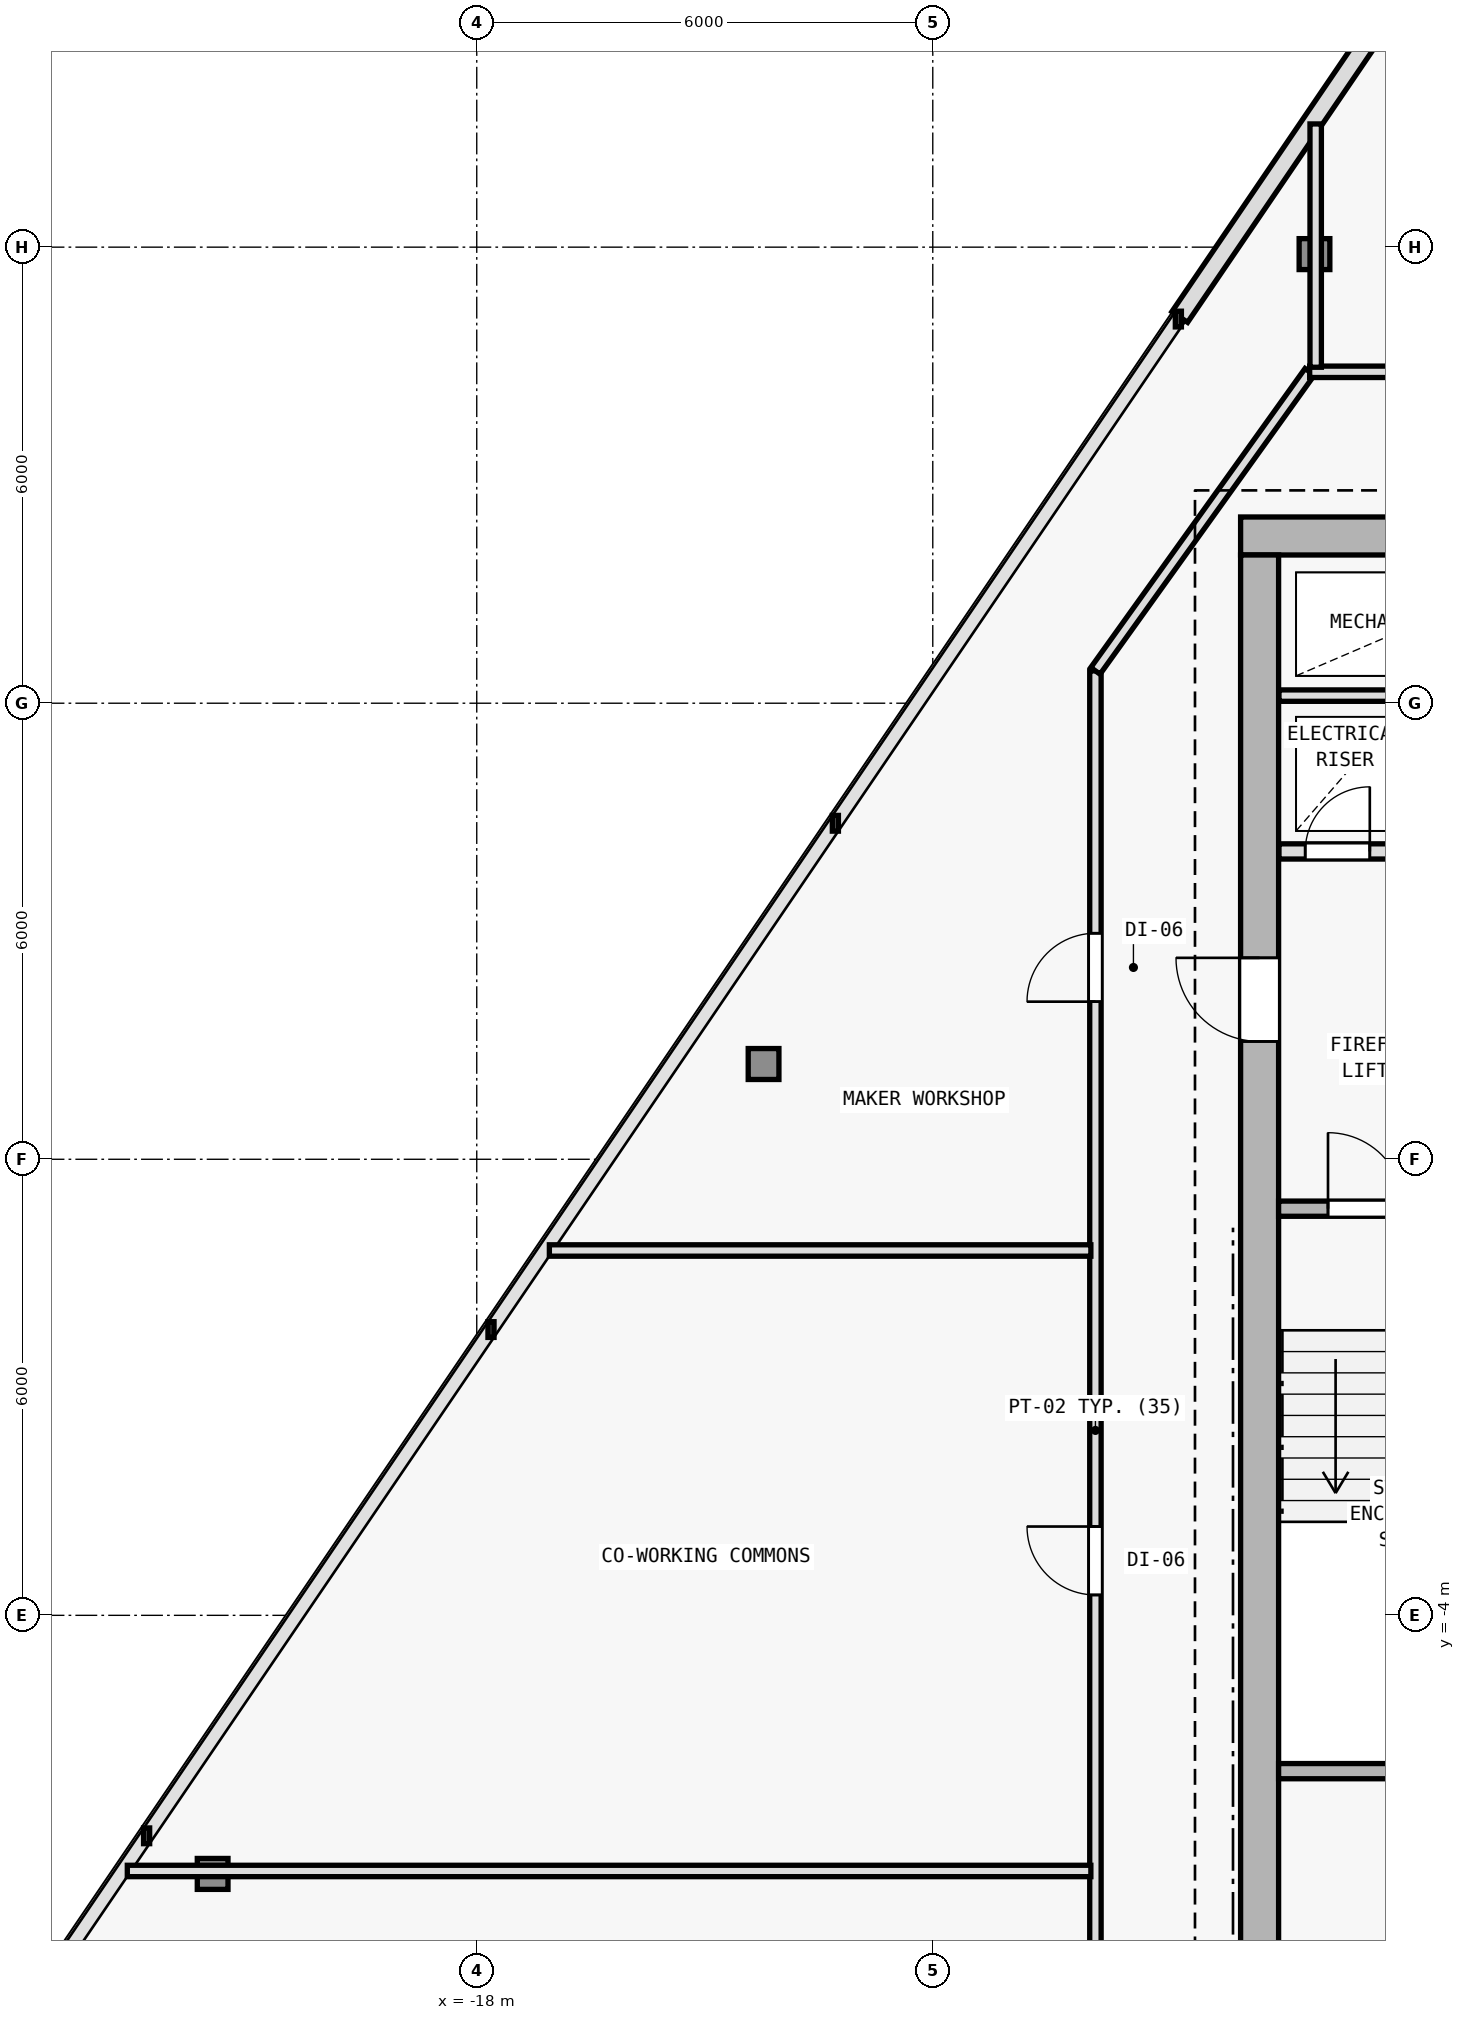
"""IFC4 building model, lengths in metres.
Left out: names, types, materials, properties, quantities, classifications, styles, units other than length and angle.
Written with IfcOpenShell. Run it as: python <this file> out.ifc"""

import sys

from ifc_helpers import new_model, si_unit, direction, frame, frame_2d, origin, origin_2d, place, context, subcontext, project, spatial, rectangle, i_section, extrude, element, fill, save


model = new_model("IFC4")
c1 = context("Model", 3, precision=1e-05, world=origin(), true_north=direction((0.0, 1.0)))
c2 = subcontext(c1, "Body", "Model", "MODEL_VIEW")
j1 = project(units=[si_unit("LENGTHUNIT", "METRE"), si_unit("PLANEANGLEUNIT", "RADIAN")], contexts=[c1])
p1 = place(None, origin())
s1 = spatial("IfcSite", under=j1, at=p1, CompositionType="ELEMENT")
p2 = place(p1, origin())
s2 = spatial("IfcBuilding", under=s1, at=p2, CompositionType="ELEMENT")
p3 = place(p2, frame((0.0, 0.0, 145.8)))
s3 = spatial("IfcBuildingStorey", under=s2, at=p3, CompositionType="ELEMENT", Elevation=145.8)
for number, where, z_axis, x_axis in (
    (1, (-7.7, 10.2, 0.0), (0.0, 0.0, 1.0), (1.0, 0.0, 0.0)),
    (2, (-7.7, 2.0, 0.0), (0.0, 0.0, 1.0), (1.0, 0.0, 0.0)),
):
    element("IfcColumn", number, at=place(p3, frame(where, z_axis=z_axis, x_axis=x_axis)), inside=s3, PredefinedType="COLUMN", context=c2, shape_type="SweptSolid", body=[
        extrude(i_section(OverallWidth=0.404, OverallDepth=0.407, WebThickness=0.017, FlangeThickness=0.028, FilletRadius=0.015, at=origin_2d()), origin(), (0.0, 0.0, 1.0), 3.6),
    ])
p4 = place(p3, frame((-6.978, 13.908, 0.005), z_axis=(0.008774547672, -0.002516730728, 0.999958335822), x_axis=(0.275705143097, 0.961242255662, 0.0)))
e3 = element("IfcColumn", 3, at=p4, inside=s3, PredefinedType="COLUMN", context=c2, shape_type="SweptSolid", body=[
    extrude(i_section(OverallWidth=0.404, OverallDepth=0.407, WebThickness=0.017, FlangeThickness=0.028, FilletRadius=0.015, at=origin_2d()), origin(), (0.0, 0.0, 1.0), 3.589),
])
p5 = place(p3, frame((-14.226, 3.253, 0.005), z_axis=(0.017002405671, 0.009589356798, 0.999809463067), x_axis=(-0.491253415567, 0.871016694268, 0.0)))
e4 = element("IfcColumn", 4, at=p5, inside=s3, PredefinedType="COLUMN", context=c2, shape_type="SweptSolid", body=[
    extrude(i_section(OverallWidth=0.404, OverallDepth=0.407, WebThickness=0.017, FlangeThickness=0.028, FilletRadius=0.015, at=origin_2d()), origin(), (0.0, 0.0, 1.0), 3.59),
])
p6 = place(p3, frame((-21.475, -7.402, 0.005), z_axis=(0.025222449659, 0.021619242565, 0.999448065876), x_axis=(-0.650791373456, 0.759256602365, 0.0)))
e5 = element("IfcColumn", 5, at=p6, inside=s3, PredefinedType="COLUMN", context=c2, shape_type="SweptSolid", body=[
    extrude(i_section(OverallWidth=0.404, OverallDepth=0.407, WebThickness=0.017, FlangeThickness=0.028, FilletRadius=0.015, at=origin_2d()), origin(), (0.0, 0.0, 1.0), 3.591),
])
p7 = place(p3, frame((-8.75, 13.081, 0.0), z_axis=(0.0, 0.0, 1.0), x_axis=(0.562463958751, 0.82682180372, 0.0)))
e6 = element("IfcWall", 6, at=p7, inside=s3, PredefinedType="SOLIDWALL", context=c2, shape_type="SweptSolid", body=[
    extrude(rectangle(XDim=11.322, YDim=0.25, at=frame_2d((5.661, 0.0))), origin(), (0.0, 0.0, 1.0), 3.35),
])
p8 = place(p7, frame((4.861, 0.0, 0.62)))
e7 = element("IfcOpeningElement", 7, at=p8, cuts=e6, PredefinedType="OPENING", context=c2, shape_type="SweptSolid", body=[
    extrude(rectangle(XDim=1.6, YDim=2.1, at=frame_2d((0.8, 1.05))), frame((0.0, 0.135, 0.0), z_axis=(0.0, -1.0, 0.0), x_axis=(1.0, 0.0, 0.0)), (0.0, 0.0, 1.0), 0.27),
])
p9 = place(p3, frame((7.95, 10.2, 0.0), z_axis=(0.0, 0.0, 1.0), x_axis=(-1.0, 0.0, 0.0)))
e8 = element("IfcWall", 8, at=p9, inside=s3, PredefinedType="SHEAR", context=c2, shape_type="SweptSolid", body=[
    extrude(rectangle(XDim=15.9, YDim=0.5, at=frame_2d((7.95, 0.0))), origin(), (0.0, 0.0, 1.0), 3.35),
])
p10 = place(p9, frame((4.4, 0.0, 0.0)))
e9 = element("IfcOpeningElement", 9, at=p10, cuts=e8, PredefinedType="OPENING", context=c2, shape_type="SweptSolid", body=[
    extrude(rectangle(XDim=1.1, YDim=2.15, at=frame_2d((0.55, 1.075))), frame((0.0, 0.26, 0.0), z_axis=(0.0, -1.0, 0.0), x_axis=(1.0, 0.0, 0.0)), (0.0, 0.0, 1.0), 0.52),
])
p11 = place(p3, frame((-7.7, -9.15, 0.0), z_axis=(0.0, 0.0, 1.0), x_axis=(0.0, 1.0, 0.0)))
e10 = element("IfcWall", 10, at=p11, inside=s3, PredefinedType="SHEAR", context=c2, shape_type="SweptSolid", body=[
    extrude(rectangle(XDim=19.1, YDim=0.5, at=frame_2d((9.55, 0.0))), origin(), (0.0, 0.0, 1.0), 3.35),
])
p12 = place(p11, frame((12.7, 0.0, 0.0)))
e11 = element("IfcOpeningElement", 11, at=p12, cuts=e10, PredefinedType="OPENING", context=c2, shape_type="SweptSolid", body=[
    extrude(rectangle(XDim=1.1, YDim=2.15, at=frame_2d((0.55, 1.075))), frame((0.0, 0.26, 0.0), z_axis=(0.0, -1.0, 0.0), x_axis=(1.0, 0.0, 0.0)), (0.0, 0.0, 1.0), 0.52),
])
p13 = place(p3, frame((-7.45, 1.35, 0.0), z_axis=(0.0, 0.0, 1.0), x_axis=(1.0, 0.0, 0.0)))
e12 = element("IfcWall", 12, at=p13, inside=s3, PredefinedType="SOLIDWALL", context=c2, shape_type="SweptSolid", body=[
    extrude(rectangle(XDim=3.4, YDim=0.2, at=frame_2d((1.7, 0.0))), origin(), (0.0, 0.0, 1.0), 3.35),
])
p14 = place(p13, frame((0.65, 0.0, 0.0)))
e13 = element("IfcOpeningElement", 13, at=p14, cuts=e12, PredefinedType="OPENING", context=c2, shape_type="SweptSolid", body=[
    extrude(rectangle(XDim=1.0, YDim=2.15, at=frame_2d((0.5, 1.075))), frame((0.0, 0.11, 0.0), z_axis=(0.0, -1.0, 0.0), x_axis=(1.0, 0.0, 0.0)), (0.0, 0.0, 1.0), 0.22),
])
p15 = place(p3, frame((-7.445, 6.05, 0.0), z_axis=(0.0, 0.0, 1.0), x_axis=(1.0, 0.0, 0.0)))
e14 = element("IfcWall", 14, at=p15, inside=s3, PredefinedType="SOLIDWALL", context=c2, shape_type="SweptSolid", body=[
    extrude(rectangle(XDim=3.595, YDim=0.2, at=frame_2d((1.797, 0.0))), origin(), (0.0, 0.0, 1.0), 3.35),
])
p16 = place(p15, frame((0.345, 0.0, 0.0)))
e15 = element("IfcOpeningElement", 15, at=p16, cuts=e14, PredefinedType="OPENING", context=c2, shape_type="SweptSolid", body=[
    extrude(rectangle(XDim=0.85, YDim=2.1, at=frame_2d((0.425, 1.05))), frame((0.0, 0.11, 0.0), z_axis=(0.0, -1.0, 0.0), x_axis=(1.0, 0.0, 0.0)), (0.0, 0.0, 1.0), 0.22),
])
p17 = place(p15, frame((2.145, 0.0, 0.0)))
e16 = element("IfcOpeningElement", 16, at=p17, cuts=e14, PredefinedType="OPENING", context=c2, shape_type="SweptSolid", body=[
    extrude(rectangle(XDim=0.85, YDim=2.1, at=frame_2d((0.425, 1.05))), frame((0.0, 0.11, 0.0), z_axis=(0.0, -1.0, 0.0), x_axis=(1.0, 0.0, 0.0)), (0.0, 0.0, 1.0), 0.22),
])
p18 = place(p3, frame((-7.445, 8.1, 0.0), z_axis=(0.0, 0.0, 1.0), x_axis=(1.0, 0.0, 0.0)))
e17 = element("IfcWall", 17, at=p18, inside=s3, PredefinedType="PARTITIONING", context=c2, shape_type="SweptSolid", body=[
    extrude(rectangle(XDim=3.595, YDim=0.15, at=frame_2d((1.797, 0.0))), origin(), (0.0, 0.0, 1.0), 3.35),
])
p19 = place(p3, frame((-7.45, -6.05, 0.0), z_axis=(0.0, 0.0, 1.0), x_axis=(1.0, 0.0, 0.0)))
e18 = element("IfcWall", 18, at=p19, inside=s3, PredefinedType="SOLIDWALL", context=c2, shape_type="SweptSolid", body=[
    extrude(rectangle(XDim=3.4, YDim=0.2, at=frame_2d((1.7, 0.0))), origin(), (0.0, 0.0, 1.0), 3.35),
])
p20 = place(p3, frame((-9.86, -11.56, 0.0), z_axis=(0.0, 0.0, 1.0), x_axis=(0.0, 1.0, 0.0)))
e19 = element("IfcWall", 19, at=p20, inside=s3, PredefinedType="PARTITIONING", context=c2, shape_type="SweptSolid", body=[
    extrude(rectangle(XDim=19.986, YDim=0.15, at=frame_2d((9.993, 0.0))), origin(), (0.0, 0.0, 1.0), 2.775),
])
p21 = place(p20, frame((7.828, 0.0, 0.0)))
e20 = element("IfcOpeningElement", 20, at=p21, cuts=e19, PredefinedType="OPENING", context=c2, shape_type="SweptSolid", body=[
    extrude(rectangle(XDim=0.9, YDim=2.1, at=frame_2d((0.45, 1.05))), frame((0.0, 0.085, 0.0), z_axis=(0.0, -1.0, 0.0), x_axis=(1.0, 0.0, 0.0)), (0.0, 0.0, 1.0), 0.17),
])
p22 = place(p20, frame((1.738, 0.0, 0.0)))
e21 = element("IfcOpeningElement", 21, at=p22, cuts=e19, PredefinedType="OPENING", context=c2, shape_type="SweptSolid", body=[
    extrude(rectangle(XDim=0.9, YDim=2.1, at=frame_2d((0.45, 1.05))), frame((0.0, 0.085, 0.0), z_axis=(0.0, -1.0, 0.0), x_axis=(1.0, 0.0, 0.0)), (0.0, 0.0, 1.0), 0.17),
])
p23 = place(p20, frame((15.634, 0.0, 0.0)))
e22 = element("IfcOpeningElement", 22, at=p23, cuts=e19, PredefinedType="OPENING", context=c2, shape_type="SweptSolid", body=[
    extrude(rectangle(XDim=0.9, YDim=2.1, at=frame_2d((0.45, 1.05))), frame((0.0, 0.085, 0.0), z_axis=(0.0, -1.0, 0.0), x_axis=(1.0, 0.0, 0.0)), (0.0, 0.0, 1.0), 0.17),
])
p24 = place(p3, frame((-9.86, 8.426, 0.0), z_axis=(0.0, 0.0, 1.0), x_axis=(0.582449511476, 0.812866881218, 0.0)))
e23 = element("IfcWall", 23, at=p24, inside=s3, PredefinedType="PARTITIONING", context=c2, shape_type="SweptSolid", body=[
    extrude(rectangle(XDim=4.84, YDim=0.15, at=frame_2d((2.42, 0.0))), origin(), (0.0, 0.0, 1.0), 2.965),
])
p25 = place(p3, frame((-7.041, 12.36, 0.0), z_axis=(0.0, 0.0, 1.0), x_axis=(1.0, 0.0, 0.0)))
e24 = element("IfcWall", 24, at=p25, inside=s3, PredefinedType="PARTITIONING", context=c2, shape_type="SweptSolid", body=[
    extrude(rectangle(XDim=14.064, YDim=0.15, at=frame_2d((7.032, 0.0))), origin(), (0.0, 0.0, 1.0), 2.965),
])
p26 = place(p25, frame((12.17, 0.0, 0.0)))
e25 = element("IfcOpeningElement", 25, at=p26, cuts=e24, PredefinedType="OPENING", context=c2, shape_type="SweptSolid", body=[
    extrude(rectangle(XDim=0.9, YDim=2.1, at=frame_2d((0.45, 1.05))), frame((0.0, 0.085, 0.0), z_axis=(0.0, -1.0, 0.0), x_axis=(1.0, 0.0, 0.0)), (0.0, 0.0, 1.0), 0.17),
])
p27 = place(p25, frame((9.223, 0.0, 0.0)))
e26 = element("IfcOpeningElement", 26, at=p27, cuts=e24, PredefinedType="OPENING", context=c2, shape_type="SweptSolid", body=[
    extrude(rectangle(XDim=0.9, YDim=2.1, at=frame_2d((0.45, 1.05))), frame((0.0, 0.085, 0.0), z_axis=(0.0, -1.0, 0.0), x_axis=(1.0, 0.0, 0.0)), (0.0, 0.0, 1.0), 0.17),
])
p28 = place(p25, frame((3.635, 0.0, 0.0)))
e27 = element("IfcOpeningElement", 27, at=p28, cuts=e24, PredefinedType="OPENING", context=c2, shape_type="SweptSolid", body=[
    extrude(rectangle(XDim=0.9, YDim=2.1, at=frame_2d((0.45, 1.05))), frame((0.0, 0.085, 0.0), z_axis=(0.0, -1.0, 0.0), x_axis=(1.0, 0.0, 0.0)), (0.0, 0.0, 1.0), 0.17),
])
p29 = place(p3, frame((-6.962, 12.42, 0.0), z_axis=(0.0, 0.0, 1.0), x_axis=(0.0, 1.0, 0.0)))
e28 = element("IfcWall", 28, at=p29, inside=s3, PredefinedType="PARTITIONING", context=c2, shape_type="SweptSolid", body=[
    extrude(rectangle(XDim=3.201, YDim=0.15, at=frame_2d((1.601, 0.0))), origin(), (0.0, 0.0, 1.0), 2.885),
])
p30 = place(p3, frame((-9.92, -7.363, 0.0), z_axis=(0.0, 0.0, 1.0), x_axis=(-1.0, 0.0, 0.0)))
e29 = element("IfcWall", 29, at=p30, inside=s3, PredefinedType="PARTITIONING", context=c2, shape_type="SweptSolid", body=[
    extrude(rectangle(XDim=12.678, YDim=0.15, at=frame_2d((6.339, 0.0))), origin(), (0.0, 0.0, 1.0), 2.775),
])
p31 = place(p3, frame((-9.92, 0.8, 0.0), z_axis=(0.0, 0.0, 1.0), x_axis=(-1.0, 0.0, 0.0)))
e30 = element("IfcWall", 30, at=p31, inside=s3, PredefinedType="PARTITIONING", context=c2, shape_type="SweptSolid", body=[
    extrude(rectangle(XDim=7.125, YDim=0.15, at=frame_2d((3.562, 0.0))), origin(), (0.0, 0.0, 1.0), 2.875),
])
p32 = place(p12, origin())
e31 = element("IfcDoor", 31, at=p32, inside=s3, OperationType="SINGLE_SWING_RIGHT", PredefinedType="DOOR", context=c2, shape_type="SweptSolid", body=[
    extrude(rectangle(XDim=1.1, YDim=2.15, at=frame_2d((0.55, 1.075))), frame((0.0, 0.025, 0.0), z_axis=(0.0, -1.0, 0.0), x_axis=(1.0, 0.0, 0.0)), (0.0, 0.0, 1.0), 0.05),
])
fill(e11, e31)
p33 = place(p14, origin())
e32 = element("IfcDoor", 32, at=p33, inside=s3, OperationType="SINGLE_SWING_LEFT", PredefinedType="DOOR", context=c2, shape_type="SweptSolid", body=[
    extrude(rectangle(XDim=1.0, YDim=2.15, at=frame_2d((0.5, 1.075))), frame((0.0, 0.025, 0.0), z_axis=(0.0, -1.0, 0.0), x_axis=(1.0, 0.0, 0.0)), (0.0, 0.0, 1.0), 0.05),
])
fill(e13, e32)
p34 = place(p16, origin())
e33 = element("IfcDoor", 33, at=p34, inside=s3, OperationType="SINGLE_SWING_RIGHT", PredefinedType="DOOR", context=c2, shape_type="SweptSolid", body=[
    extrude(rectangle(XDim=0.85, YDim=2.1, at=frame_2d((0.425, 1.05))), frame((0.0, 0.025, 0.0), z_axis=(0.0, -1.0, 0.0), x_axis=(1.0, 0.0, 0.0)), (0.0, 0.0, 1.0), 0.05),
])
fill(e15, e33)
p35 = place(p21, origin())
e34 = element("IfcDoor", 34, at=p35, inside=s3, OperationType="SINGLE_SWING_RIGHT", PredefinedType="DOOR", context=c2, shape_type="SweptSolid", body=[
    extrude(rectangle(XDim=0.9, YDim=2.1, at=frame_2d((0.45, 1.05))), frame((0.0, 0.025, 0.0), z_axis=(0.0, -1.0, 0.0), x_axis=(1.0, 0.0, 0.0)), (0.0, 0.0, 1.0), 0.05),
])
fill(e20, e34)
p36 = place(p23, origin())
e35 = element("IfcDoor", 35, at=p36, inside=s3, OperationType="SINGLE_SWING_LEFT", PredefinedType="DOOR", context=c2, shape_type="SweptSolid", body=[
    extrude(rectangle(XDim=0.9, YDim=2.1, at=frame_2d((0.45, 1.05))), frame((0.0, 0.025, 0.0), z_axis=(0.0, -1.0, 0.0), x_axis=(1.0, 0.0, 0.0)), (0.0, 0.0, 1.0), 0.05),
])
fill(e22, e35)
save(model, sys.argv[1])
